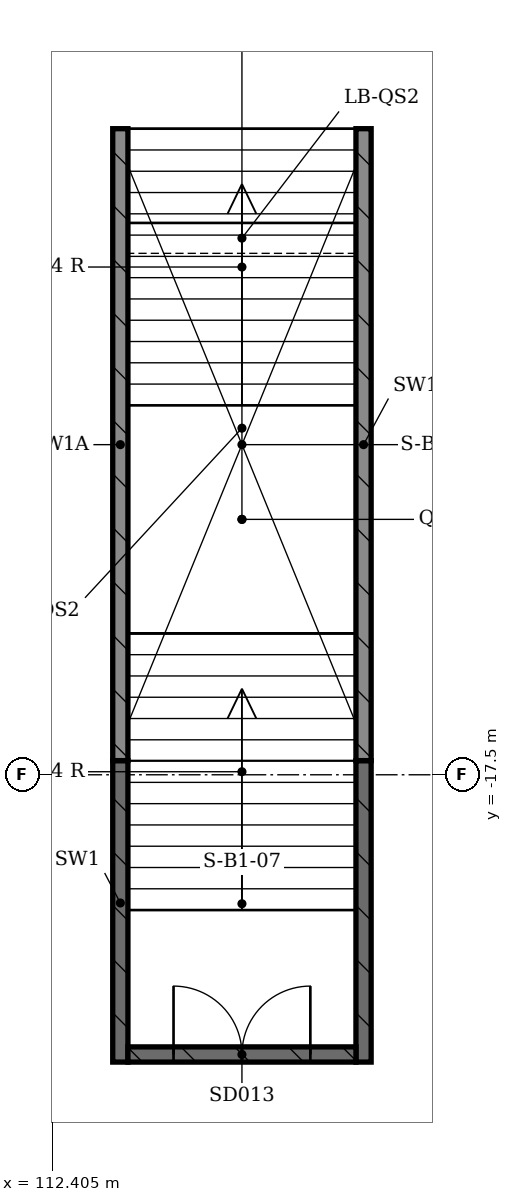
"""IFC4 building model, lengths in metres.
Left out: names, types, materials, properties, quantities, classifications, styles, units other than length and angle.
Written with IfcOpenShell. Run it as: python <this file> out.ifc"""

import sys

from ifc_helpers import new_model, si_unit, direction, frame, frame_2d, origin, place, context, subcontext, project, spatial, rectangle, extrude, element, fill, save


model = new_model("IFC4")
c1 = context("Model", 3, precision=1e-05, world=origin(), true_north=direction((0.0, 1.0)))
c2 = subcontext(c1, "Body", "Model", "MODEL_VIEW")
j1 = project(units=[si_unit("LENGTHUNIT", "METRE"), si_unit("PLANEANGLEUNIT", "RADIAN")], contexts=[c1])
p1 = place(None, origin())
s1 = spatial("IfcSite", under=j1, at=p1, CompositionType="ELEMENT")
p2 = place(p1, origin())
s2 = spatial("IfcBuilding", under=s1, at=p2, CompositionType="ELEMENT")
p3 = place(p2, frame((0.0, 0.0, -4.5)))
s3 = spatial("IfcBuildingStorey", under=s2, at=p3, CompositionType="ELEMENT", Elevation=-4.5)
for number, where, z_axis, x_axis in (
    (1, (113.3, -21.28, 0.0), (0.0, 0.0, 1.0), (0.0, 1.0, 0.0)),
    (2, (116.5, -21.28, 0.0), (0.0, 0.0, 1.0), (0.0, 1.0, 0.0)),
):
    element("IfcWall", number, at=place(p3, frame(where, z_axis=z_axis, x_axis=x_axis)), inside=s3, PredefinedType="SHEAR", context=c2, shape_type="SweptSolid", body=[
        extrude(rectangle(XDim=3.966, YDim=0.2, at=frame_2d((1.983, 0.0))), origin(), (0.0, 0.0, 1.0), 3.5),
    ])
p4 = place(p3, frame((113.4, -21.18, 0.0), z_axis=(0.0, 0.0, 1.0), x_axis=(1.0, 0.0, 0.0)))
e3 = element("IfcWall", 3, at=p4, inside=s3, PredefinedType="SHEAR", context=c2, shape_type="SweptSolid", body=[
    extrude(rectangle(XDim=3.0, YDim=0.2, at=frame_2d((1.5, 0.0))), origin(), (0.0, 0.0, 1.0), 3.5),
])
p5 = place(p4, frame((0.6, 0.0, 0.0)))
e4 = element("IfcOpeningElement", 4, at=p5, cuts=e3, PredefinedType="OPENING", context=c2, shape_type="SweptSolid", body=[
    extrude(rectangle(XDim=1.8, YDim=2.1, at=frame_2d((0.9, 1.05))), frame((0.0, 0.1, 0.0), z_axis=(0.0, -1.0, 0.0), x_axis=(1.0, 0.0, 0.0)), (0.0, 0.0, 1.0), 0.2),
])
for number, where, z_axis, x_axis in (
    (5, (113.3, -17.314, 0.0), (0.0, 0.0, 1.0), (0.0, 1.0, 0.0)),
    (6, (116.5, -17.314, 0.0), (0.0, 0.0, 1.0), (0.0, 1.0, 0.0)),
):
    element("IfcWall", number, at=place(p3, frame(where, z_axis=z_axis, x_axis=x_axis)), inside=s3, PredefinedType="SHEAR", context=c2, shape_type="SweptSolid", body=[
        extrude(rectangle(XDim=8.314, YDim=0.2, at=frame_2d((4.157, 0.0))), origin(), (0.0, 0.0, 1.0), 5.6),
    ])
p6 = place(p5, origin())
e7 = element("IfcDoor", 7, at=p6, inside=s3, OperationType="DOUBLE_DOOR_SINGLE_SWING", PredefinedType="DOOR", context=c2, shape_type="SweptSolid", body=[
    extrude(rectangle(XDim=1.8, YDim=2.1, at=frame_2d((0.9, 1.05))), frame((0.0, 0.025, 0.0), z_axis=(0.0, -1.0, 0.0), x_axis=(1.0, 0.0, 0.0)), (0.0, 0.0, 1.0), 0.05),
])
fill(e4, e7)
save(model, sys.argv[1])
